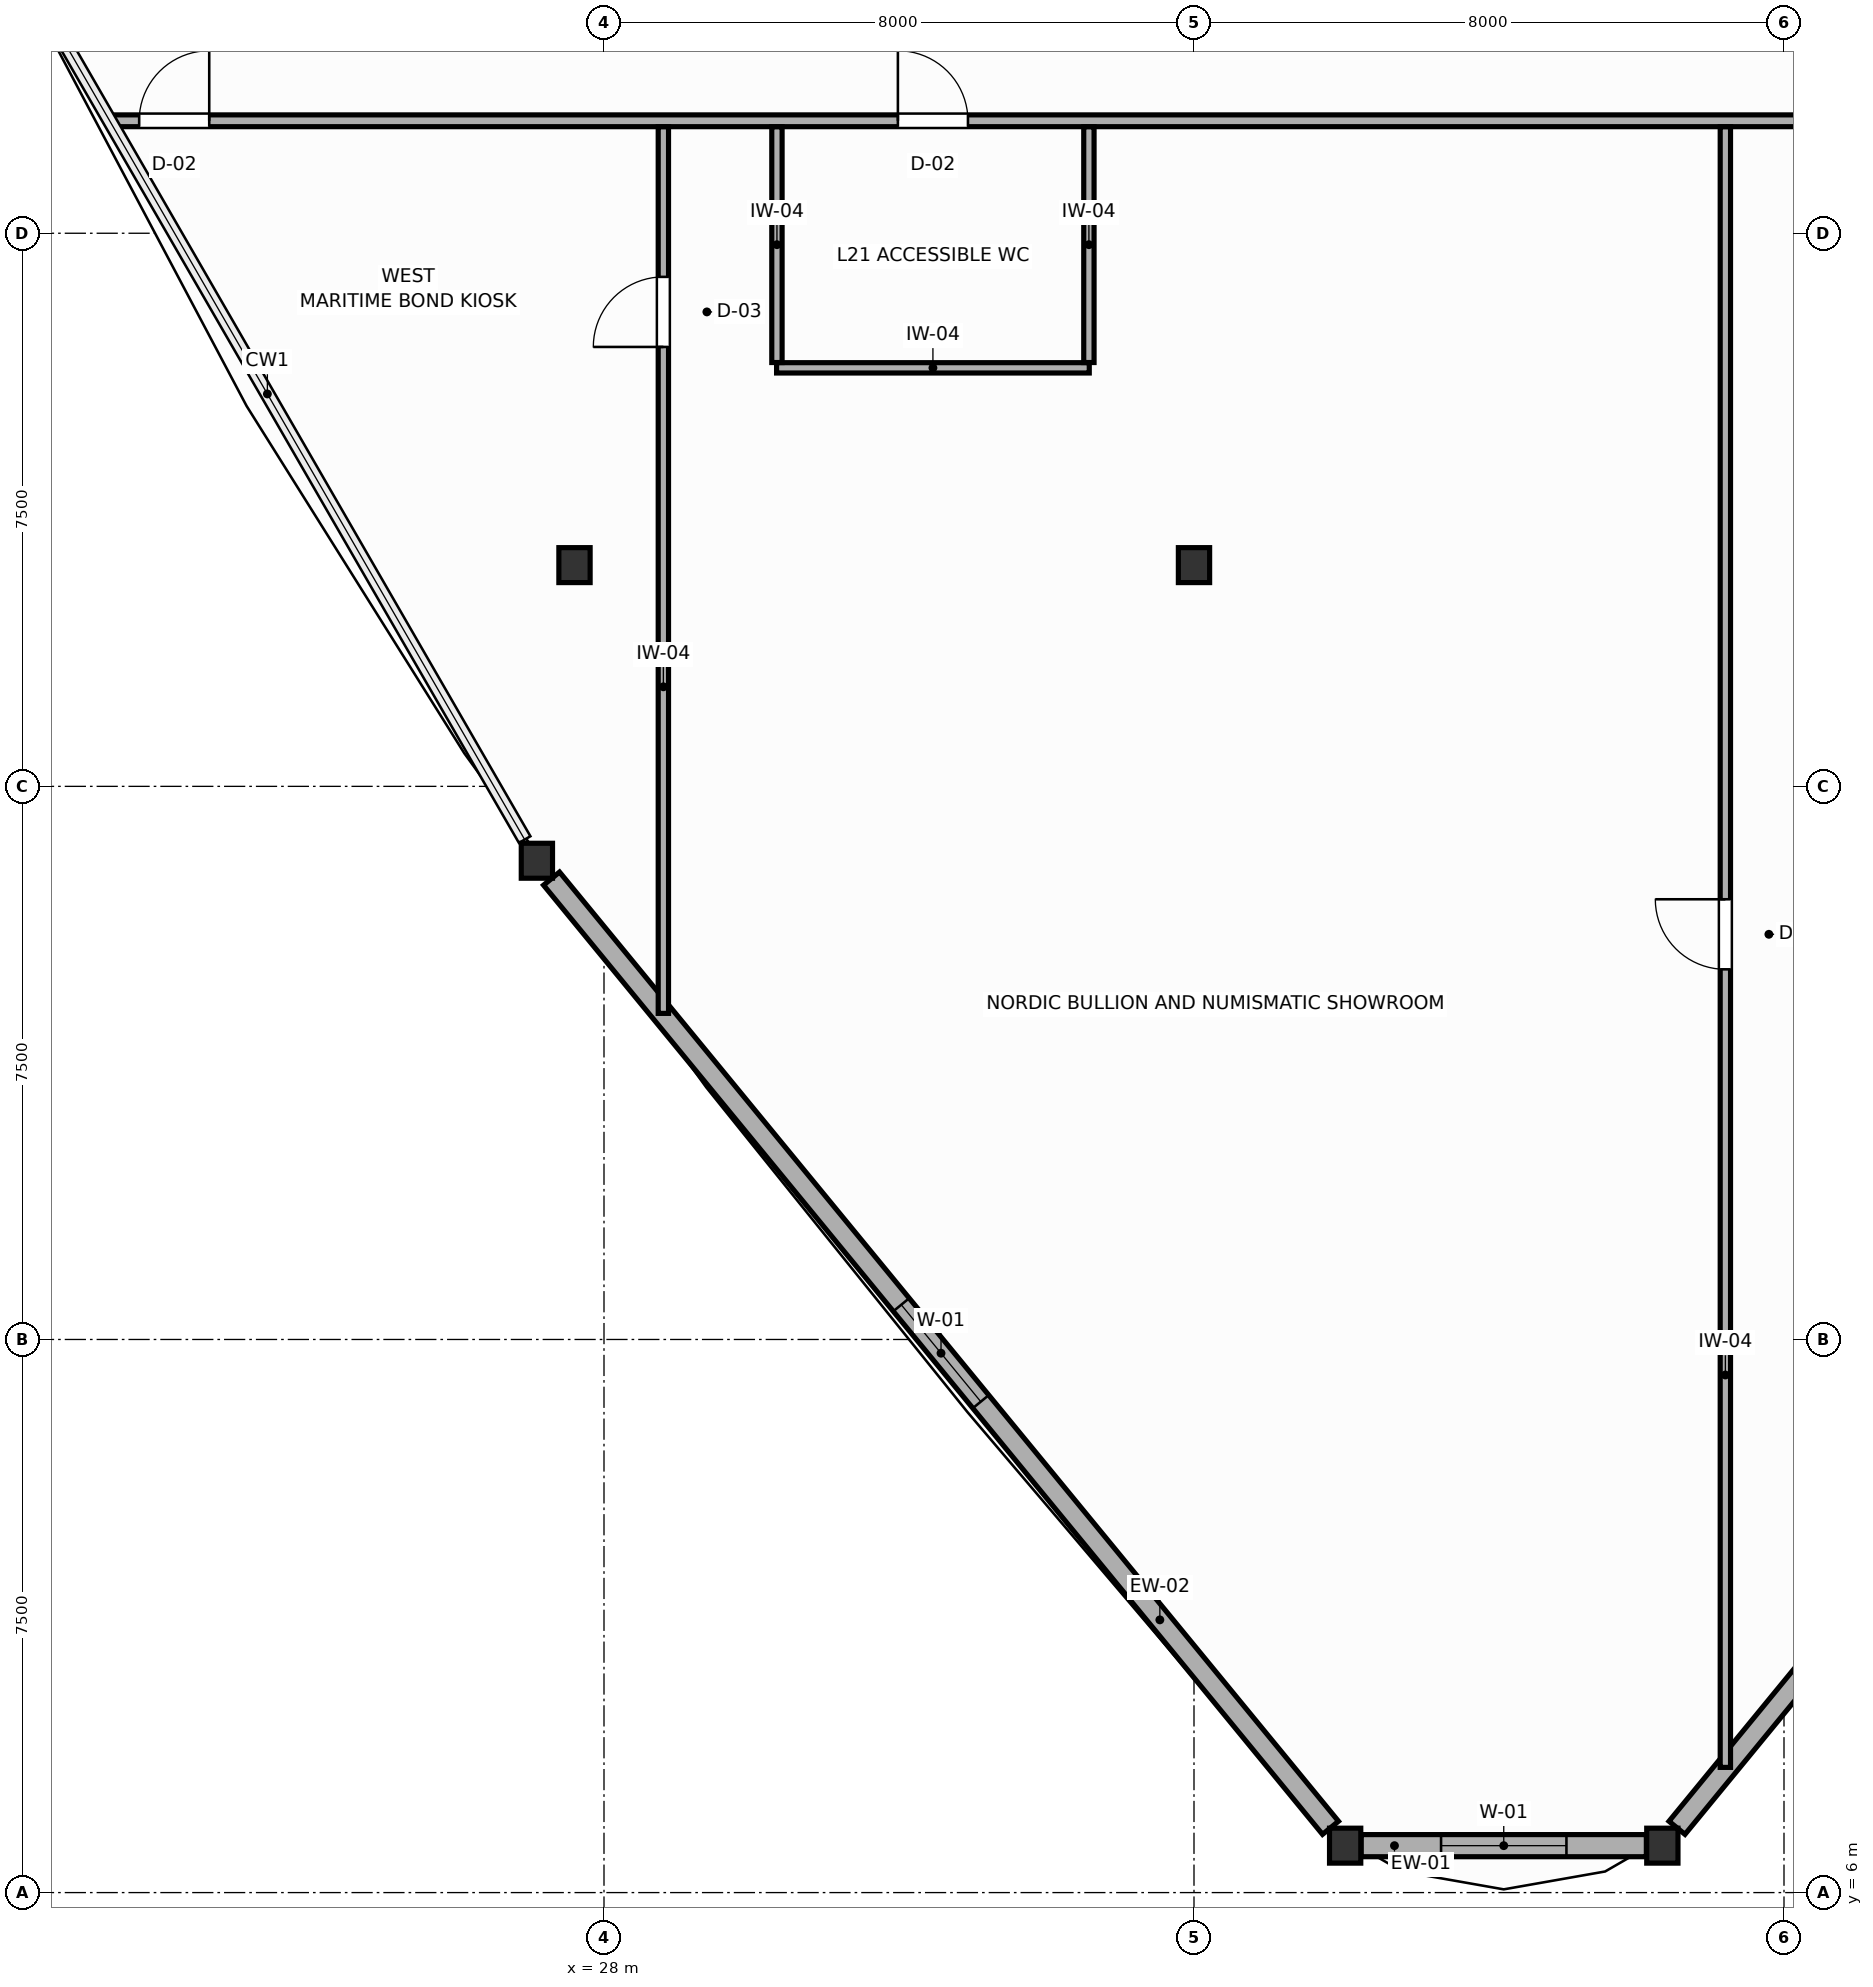
"""IFC4 building model, lengths in metres.
Left out: names, types, materials, properties, quantities, classifications, styles, units other than length and angle.
Written with IfcOpenShell. Run it as: python <this file> out.ifc"""

import sys

from ifc_helpers import new_model, si_unit, direction, frame, frame_2d, origin, origin_2d, place, context, subcontext, project, spatial, rectangle, i_section, extrude, source, transform, mapped, element, fill, save


model = new_model("IFC4")
c1 = context("Model", 3, precision=1e-05, world=origin(), true_north=direction((0.0, 1.0)))
c2 = subcontext(c1, "Body", "Model", "MODEL_VIEW")
j1 = project(units=[si_unit("LENGTHUNIT", "METRE"), si_unit("PLANEANGLEUNIT", "RADIAN")], contexts=[c1])
p1 = place(None, origin())
s1 = spatial("IfcSite", under=j1, at=p1, CompositionType="ELEMENT")
p2 = place(p1, origin())
s2 = spatial("IfcBuilding", under=s1, at=p2, CompositionType="ELEMENT")
p3 = place(p2, frame((0.0, 0.0, 87.3)))
s3 = spatial("IfcBuildingStorey", under=s2, at=p3, CompositionType="ELEMENT", Elevation=87.3)
m1 = source(origin(), c2, "Body", "SweptSolid", [
    extrude(i_section(OverallWidth=0.424, OverallDepth=0.474, WebThickness=0.045, FlangeThickness=0.072, FilletRadius=0.015, at=origin_2d()), origin(), (0.0, 0.0, 1.0), 3.9),
])
for number, where, z_axis, x_axis in (
    (1, (27.6, 24.0, 0.0), (0.0, 0.0, 1.0), (1.0, 0.0, 0.0)),
    (2, (36.0, 24.0, 0.0), (0.0, 0.0, 1.0), (1.0, 0.0, 0.0)),
    (3, (27.09, 19.991, 0.0), (0.0, 0.0, 1.0), (1.0, 0.0, 0.0)),
    (4, (38.05, 6.636, 0.0), (0.0, 0.0, 1.0), (1.0, 0.0, 0.0)),
    (5, (42.351, 6.636, 0.0), (0.0, 0.0, 1.0), (1.0, 0.0, 0.0)),
):
    element("IfcColumn", number, at=place(p3, frame(where, z_axis=z_axis, x_axis=x_axis)), inside=s3, PredefinedType="COLUMN", context=c2, shape_type="MappedRepresentation", body=[
        mapped(m1, transform((0.0, 0.0, 0.0), scale=1.0)),
    ])
p4 = place(p3, frame((27.289, 19.749, 0.0), z_axis=(0.0, 0.0, 1.0), x_axis=(0.634363798099, -0.77303465101, 0.0)))
e6 = element("IfcWall", 6, at=p4, inside=s3, PredefinedType="SOLIDWALL", context=c2, shape_type="SweptSolid", body=[
    extrude(rectangle(XDim=16.65, YDim=0.28, at=frame_2d((8.325, 0.0))), origin(), (0.0, 0.0, 1.0), 3.23),
])
p5 = place(p4, frame((7.475, 0.0, 0.75)))
e7 = element("IfcOpeningElement", 7, at=p5, cuts=e6, PredefinedType="OPENING", context=c2, shape_type="SweptSolid", body=[
    extrude(rectangle(XDim=1.7, YDim=1.75, at=frame_2d((0.85, 0.875))), frame((0.0, 0.15, 0.0), z_axis=(0.0, -1.0, 0.0), x_axis=(1.0, 0.0, 0.0)), (0.0, 0.0, 1.0), 0.3),
])
p6 = place(p3, frame((38.267, 6.636, 0.0), z_axis=(0.0, 0.0, 1.0), x_axis=(1.0, 0.0, 0.0)))
e8 = element("IfcWall", 8, at=p6, inside=s3, PredefinedType="SOLIDWALL", context=c2, shape_type="SweptSolid", body=[
    extrude(rectangle(XDim=3.867, YDim=0.3, at=frame_2d((1.934, 0.0))), origin(), (0.0, 0.0, 1.0), 3.23),
])
p7 = place(p6, frame((1.083, 0.0, 0.75)))
e9 = element("IfcOpeningElement", 9, at=p7, cuts=e8, PredefinedType="OPENING", context=c2, shape_type="SweptSolid", body=[
    extrude(rectangle(XDim=1.7, YDim=1.75, at=frame_2d((0.85, 0.875))), frame((0.0, 0.16, 0.0), z_axis=(0.0, -1.0, 0.0), x_axis=(1.0, 0.0, 0.0)), (0.0, 0.0, 1.0), 0.32),
])
p8 = place(p3, frame((42.549, 6.878, 0.0), z_axis=(0.0, 0.0, 1.0), x_axis=(0.634372560511, 0.77302746036, 0.0)))
e10 = element("IfcWall", 10, at=p8, inside=s3, PredefinedType="SOLIDWALL", context=c2, shape_type="SweptSolid", body=[
    extrude(rectangle(XDim=16.65, YDim=0.28, at=frame_2d((8.325, 0.0))), origin(), (0.0, 0.0, 1.0), 3.23),
])
p9 = place(p8, frame((7.475, 0.0, 0.75)))
e11 = element("IfcOpeningElement", 11, at=p9, cuts=e10, PredefinedType="OPENING", context=c2, shape_type="SweptSolid", body=[
    extrude(rectangle(XDim=1.7, YDim=1.75, at=frame_2d((0.85, 0.875))), frame((0.0, 0.15, 0.0), z_axis=(0.0, -1.0, 0.0), x_axis=(1.0, 0.0, 0.0)), (0.0, 0.0, 1.0), 0.3),
])
p10 = place(p3, frame((21.317, 30.025, 0.0), z_axis=(0.0, 0.0, 1.0), x_axis=(1.0, 0.0, 0.0)))
e12 = element("IfcWall", 12, at=p10, inside=s3, PredefinedType="PARTITIONING", context=c2, shape_type="SweptSolid", body=[
    extrude(rectangle(XDim=37.766, YDim=0.16, at=frame_2d((18.883, 0.0))), origin(), (0.0, 0.0, 1.0), 3.68),
])
p11 = place(p10, frame((10.668, 0.0, 0.0)))
e13 = element("IfcOpeningElement", 13, at=p11, cuts=e12, PredefinedType="OPENING", context=c2, shape_type="SweptSolid", body=[
    extrude(rectangle(XDim=0.95, YDim=2.05, at=frame_2d((0.475, 1.025))), frame((0.0, 0.09, 0.0), z_axis=(0.0, -1.0, 0.0), x_axis=(1.0, 0.0, 0.0)), (0.0, 0.0, 1.0), 0.18),
])
p12 = place(p10, frame((0.38, 0.0, 0.0)))
e14 = element("IfcOpeningElement", 14, at=p12, cuts=e12, PredefinedType="OPENING", context=c2, shape_type="SweptSolid", body=[
    extrude(rectangle(XDim=0.95, YDim=2.05, at=frame_2d((0.475, 1.025))), frame((0.0, 0.09, 0.0), z_axis=(0.0, -1.0, 0.0), x_axis=(1.0, 0.0, 0.0)), (0.0, 0.0, 1.0), 0.18),
])
p13 = place(p3, frame((43.205, 7.698, 0.0), z_axis=(0.0, 0.0, 1.0), x_axis=(0.0, 1.0, 0.0)))
e15 = element("IfcWall", 15, at=p13, inside=s3, PredefinedType="PARTITIONING", context=c2, shape_type="SweptSolid", body=[
    extrude(rectangle(XDim=22.246, YDim=0.14, at=frame_2d((11.123, 0.0))), origin(), (0.0, 0.0, 1.0), 3.18),
])
p14 = place(p13, frame((10.821, 0.0, 0.0)))
e16 = element("IfcOpeningElement", 16, at=p14, cuts=e15, PredefinedType="OPENING", context=c2, shape_type="SweptSolid", body=[
    extrude(rectangle(XDim=0.95, YDim=2.05, at=frame_2d((0.475, 1.025))), frame((0.0, 0.08, 0.0), z_axis=(0.0, -1.0, 0.0), x_axis=(1.0, 0.0, 0.0)), (0.0, 0.0, 1.0), 0.16),
])
p15 = place(p3, frame((28.805, 17.921, 0.0), z_axis=(0.0, 0.0, 1.0), x_axis=(0.0, 1.0, 0.0)))
e17 = element("IfcWall", 17, at=p15, inside=s3, PredefinedType="PARTITIONING", context=c2, shape_type="SweptSolid", body=[
    extrude(rectangle(XDim=12.022, YDim=0.14, at=frame_2d((6.011, 0.0))), origin(), (0.0, 0.0, 1.0), 3.68),
])
p16 = place(p15, frame((9.037, 0.0, 0.0)))
e18 = element("IfcOpeningElement", 18, at=p16, cuts=e17, PredefinedType="OPENING", context=c2, shape_type="SweptSolid", body=[
    extrude(rectangle(XDim=0.95, YDim=2.05, at=frame_2d((0.475, 1.025))), frame((0.0, 0.08, 0.0), z_axis=(0.0, -1.0, 0.0), x_axis=(1.0, 0.0, 0.0)), (0.0, 0.0, 1.0), 0.16),
])
p17 = place(p3, frame((30.34, 26.675, 0.0), z_axis=(0.0, 0.0, 1.0), x_axis=(1.0, 0.0, 0.0)))
e19 = element("IfcWall", 19, at=p17, inside=s3, PredefinedType="PARTITIONING", context=c2, shape_type="SweptSolid", body=[
    extrude(rectangle(XDim=4.24, YDim=0.14, at=frame_2d((2.12, 0.0))), origin(), (0.0, 0.0, 1.0), 3.68),
])
for number, where, z_axis, x_axis in (
    (20, (34.575, 26.747, 0.0), (0.0, 0.0, 1.0), (0.0, 1.0, 0.0)),
    (21, (30.345, 26.747, 0.0), (0.0, 0.0, 1.0), (0.0, 1.0, 0.0)),
):
    element("IfcWall", number, at=place(p3, frame(where, z_axis=z_axis, x_axis=x_axis)), inside=s3, PredefinedType="PARTITIONING", context=c2, shape_type="SweptSolid", body=[
        extrude(rectangle(XDim=3.196, YDim=0.14, at=frame_2d((1.598, 0.0))), origin(), (0.0, 0.0, 1.0), 3.68),
    ])
p18 = place(p5, origin())
e22 = element("IfcWindow", 22, at=p18, inside=s3, PartitioningType="SINGLE_PANEL", PredefinedType="WINDOW", context=c2, shape_type="SweptSolid", body=[
    extrude(rectangle(XDim=1.7, YDim=1.75, at=frame_2d((0.85, 0.875))), frame((0.0, 0.03, 0.0), z_axis=(0.0, -1.0, 0.0), x_axis=(1.0, 0.0, 0.0)), (0.0, 0.0, 1.0), 0.06),
])
fill(e7, e22)
p19 = place(p7, origin())
e23 = element("IfcWindow", 23, at=p19, inside=s3, PartitioningType="SINGLE_PANEL", PredefinedType="WINDOW", context=c2, shape_type="SweptSolid", body=[
    extrude(rectangle(XDim=1.7, YDim=1.75, at=frame_2d((0.85, 0.875))), frame((0.0, 0.03, 0.0), z_axis=(0.0, -1.0, 0.0), x_axis=(1.0, 0.0, 0.0)), (0.0, 0.0, 1.0), 0.06),
])
fill(e9, e23)
p20 = place(p11, origin())
e24 = element("IfcDoor", 24, at=p20, inside=s3, OperationType="SINGLE_SWING_LEFT", PredefinedType="DOOR", context=c2, shape_type="SweptSolid", body=[
    extrude(rectangle(XDim=0.95, YDim=2.05, at=frame_2d((0.475, 1.025))), frame((0.0, 0.025, 0.0), z_axis=(0.0, -1.0, 0.0), x_axis=(1.0, 0.0, 0.0)), (0.0, 0.0, 1.0), 0.05),
])
fill(e13, e24)
p21 = place(p12, origin())
e25 = element("IfcDoor", 25, at=p21, inside=s3, OperationType="SINGLE_SWING_RIGHT", PredefinedType="DOOR", context=c2, shape_type="SweptSolid", body=[
    extrude(rectangle(XDim=0.95, YDim=2.05, at=frame_2d((0.475, 1.025))), frame((0.0, 0.025, 0.0), z_axis=(0.0, -1.0, 0.0), x_axis=(1.0, 0.0, 0.0)), (0.0, 0.0, 1.0), 0.05),
])
fill(e14, e25)
p22 = place(p14, origin())
e26 = element("IfcDoor", 26, at=p22, inside=s3, OperationType="SINGLE_SWING_RIGHT", PredefinedType="DOOR", context=c2, shape_type="SweptSolid", body=[
    extrude(rectangle(XDim=0.95, YDim=2.05, at=frame_2d((0.475, 1.025))), frame((0.0, 0.025, 0.0), z_axis=(0.0, -1.0, 0.0), x_axis=(1.0, 0.0, 0.0)), (0.0, 0.0, 1.0), 0.05),
])
fill(e16, e26)
p23 = place(p16, origin())
e27 = element("IfcDoor", 27, at=p23, inside=s3, OperationType="SINGLE_SWING_LEFT", PredefinedType="DOOR", context=c2, shape_type="SweptSolid", body=[
    extrude(rectangle(XDim=0.95, YDim=2.05, at=frame_2d((0.475, 1.025))), frame((0.0, 0.025, 0.0), z_axis=(0.0, -1.0, 0.0), x_axis=(1.0, 0.0, 0.0)), (0.0, 0.0, 1.0), 0.05),
])
fill(e18, e27)
save(model, sys.argv[1])
